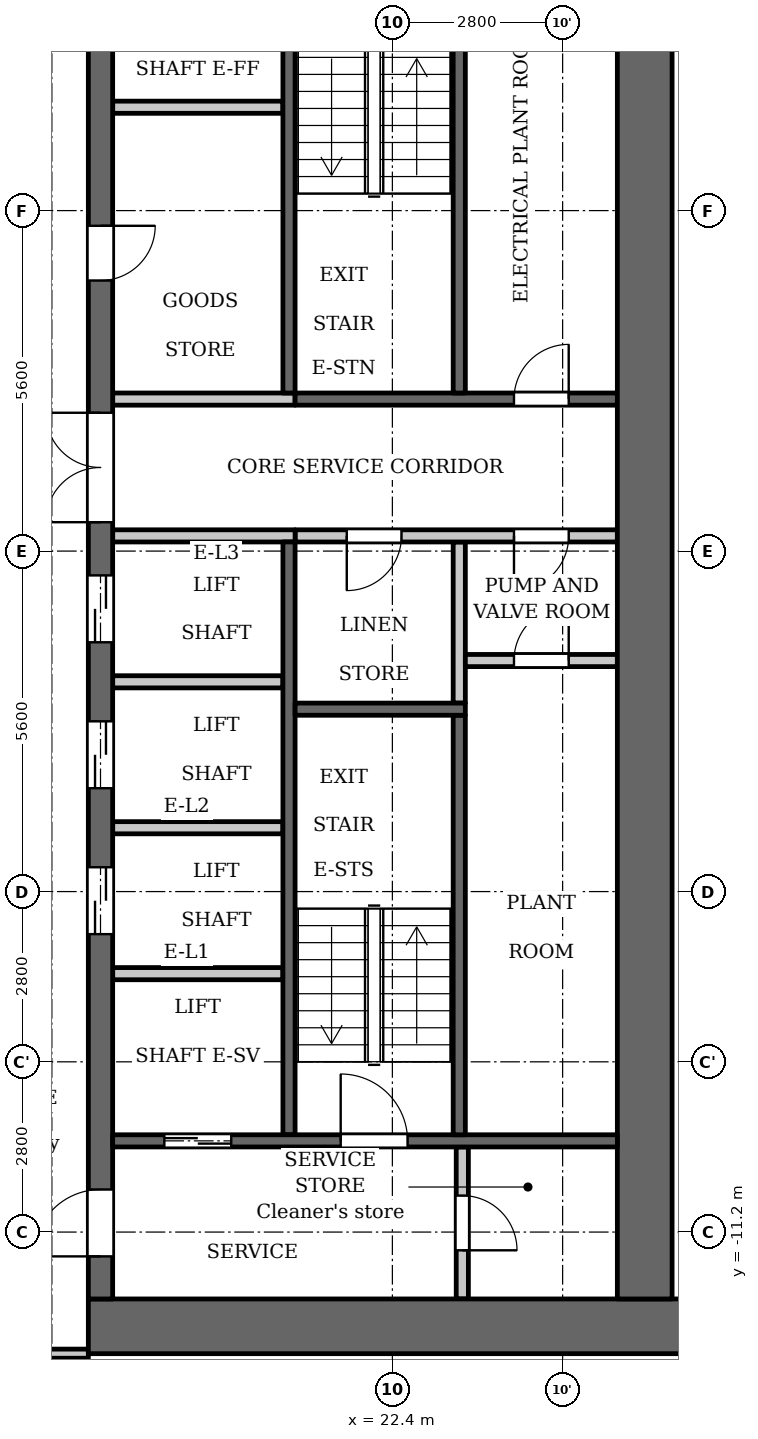
"""IFC4 building model, lengths in metres.
Left out: names, types, materials, properties, quantities, classifications, styles, units other than length and angle.
Written with IfcOpenShell. Run it as: python <this file> out.ifc"""

import sys

from ifc_helpers import new_model, si_unit, direction, frame, frame_2d, origin, place, context, subcontext, project, spatial, rectangle, extrude, element, fill, save


model = new_model("IFC4")
c1 = context("Model", 3, precision=1e-05, world=origin(), true_north=direction((0.0, 1.0)))
c2 = subcontext(c1, "Body", "Model", "MODEL_VIEW")
j1 = project(units=[si_unit("LENGTHUNIT", "METRE"), si_unit("PLANEANGLEUNIT", "RADIAN")], contexts=[c1])
p1 = place(None, origin())
s1 = spatial("IfcSite", under=j1, at=p1, CompositionType="ELEMENT")
p2 = place(p1, origin())
s2 = spatial("IfcBuilding", under=s1, at=p2, CompositionType="ELEMENT")
p3 = place(p2, frame((0.0, 0.0, 34.0)))
s3 = spatial("IfcBuildingStorey", under=s2, at=p3, CompositionType="ELEMENT", Elevation=34.0)
p4 = place(p3, frame((23.5, -2.5, 0.0), z_axis=(0.0, 0.0, 1.0), x_axis=(0.0, 1.0, 0.0)))
e1 = element("IfcWall", 1, at=p4, inside=s3, PredefinedType="PARTITIONING", context=c2, shape_type="SweptSolid", body=[
    extrude(rectangle(XDim=2.65, YDim=0.2, at=frame_2d((1.325, 0.0))), origin(), (0.0, 0.0, 1.0), 3.2),
])
p5 = place(p3, frame((20.7, 2.6, 0.0), z_axis=(0.0, 0.0, 1.0), x_axis=(0.0, 1.0, 0.0)))
e2 = element("IfcWall", 2, at=p5, inside=s3, PredefinedType="SHEAR", context=c2, shape_type="SweptSolid", body=[
    extrude(rectangle(XDim=7.0, YDim=0.2, at=frame_2d((3.5, 0.0))), origin(), (0.0, 0.0, 1.0), 3.2),
])
p6 = place(p3, frame((20.7, -9.6, 0.0), z_axis=(0.0, 0.0, 1.0), x_axis=(0.0, 1.0, 0.0)))
e3 = element("IfcWall", 3, at=p6, inside=s3, PredefinedType="SHEAR", context=c2, shape_type="SweptSolid", body=[
    extrude(rectangle(XDim=9.75, YDim=0.2, at=frame_2d((4.875, 0.0))), origin(), (0.0, 0.0, 1.0), 3.2),
])
p7 = place(p3, frame((20.8, 2.5, 0.0), z_axis=(0.0, 0.0, 1.0), x_axis=(1.0, 0.0, 0.0)))
e4 = element("IfcWall", 4, at=p7, inside=s3, PredefinedType="SHEAR", context=c2, shape_type="SweptSolid", body=[
    extrude(rectangle(XDim=5.3, YDim=0.2, at=frame_2d((2.65, 0.0))), origin(), (0.0, 0.0, 1.0), 3.2),
])
p8 = place(p7, frame((3.6, 0.0, 0.0)))
e5 = element("IfcOpeningElement", 5, at=p8, cuts=e4, PredefinedType="OPENING", context=c2, shape_type="SweptSolid", body=[
    extrude(rectangle(XDim=0.9, YDim=2.1, at=frame_2d((0.45, 1.05))), frame((0.0, 0.11, 0.0), z_axis=(0.0, -1.0, 0.0), x_axis=(1.0, 0.0, 0.0)), (0.0, 0.0, 1.0), 0.22),
])
p9 = place(p3, frame((20.8, 0.25, 0.0), z_axis=(0.0, 0.0, 1.0), x_axis=(1.0, 0.0, 0.0)))
e6 = element("IfcWall", 6, at=p9, inside=s3, PredefinedType="PARTITIONING", context=c2, shape_type="SweptSolid", body=[
    extrude(rectangle(XDim=5.3, YDim=0.2, at=frame_2d((2.65, 0.0))), origin(), (0.0, 0.0, 1.0), 3.2),
])
p10 = place(p9, frame((0.85, 0.0, 0.0)))
e7 = element("IfcOpeningElement", 7, at=p10, cuts=e6, PredefinedType="OPENING", context=c2, shape_type="SweptSolid", body=[
    extrude(rectangle(XDim=0.9, YDim=2.1, at=frame_2d((0.45, 1.05))), frame((0.0, 0.11, 0.0), z_axis=(0.0, -1.0, 0.0), x_axis=(1.0, 0.0, 0.0)), (0.0, 0.0, 1.0), 0.22),
])
p11 = place(p9, frame((3.6, 0.0, 0.0)))
e8 = element("IfcOpeningElement", 8, at=p11, cuts=e6, PredefinedType="OPENING", context=c2, shape_type="SweptSolid", body=[
    extrude(rectangle(XDim=0.9, YDim=2.1, at=frame_2d((0.45, 1.05))), frame((0.0, 0.11, 0.0), z_axis=(0.0, -1.0, 0.0), x_axis=(1.0, 0.0, 0.0)), (0.0, 0.0, 1.0), 0.22),
])
p12 = place(p3, frame((17.4, -12.75, 0.0), z_axis=(0.0, 0.0, 1.0), x_axis=(1.0, 0.0, 0.0)))
e9 = element("IfcWall", 9, at=p12, inside=s3, PredefinedType="SHEAR", context=c2, shape_type="SweptSolid", body=[
    extrude(rectangle(XDim=10.4, YDim=0.9, at=frame_2d((5.2, 0.0))), origin(), (0.0, 0.0, 1.0), 3.2),
])
p13 = place(p3, frame((17.6, -12.3, 0.0), z_axis=(0.0, 0.0, 1.0), x_axis=(0.0, 1.0, 0.0)))
e10 = element("IfcWall", 10, at=p13, inside=s3, PredefinedType="SHEAR", context=c2, shape_type="SweptSolid", body=[
    extrude(rectangle(XDim=24.6, YDim=0.4, at=frame_2d((12.3, 0.0))), origin(), (0.0, 0.0, 1.0), 3.2),
])
p14 = place(p13, frame((6.0, 0.0, 0.0)))
e11 = element("IfcOpeningElement", 11, at=p14, cuts=e10, PredefinedType="OPENING", context=c2, shape_type="SweptSolid", body=[
    extrude(rectangle(XDim=1.1, YDim=2.1, at=frame_2d((0.55, 1.05))), frame((0.0, 0.21, 0.0), z_axis=(0.0, -1.0, 0.0), x_axis=(1.0, 0.0, 0.0)), (0.0, 0.0, 1.0), 0.42),
])
p15 = place(p13, frame((8.4, 0.0, 0.0)))
e12 = element("IfcOpeningElement", 12, at=p15, cuts=e10, PredefinedType="OPENING", context=c2, shape_type="SweptSolid", body=[
    extrude(rectangle(XDim=1.1, YDim=2.1, at=frame_2d((0.55, 1.05))), frame((0.0, 0.21, 0.0), z_axis=(0.0, -1.0, 0.0), x_axis=(1.0, 0.0, 0.0)), (0.0, 0.0, 1.0), 0.42),
])
p16 = place(p13, frame((10.8, 0.0, 0.0)))
e13 = element("IfcOpeningElement", 13, at=p16, cuts=e10, PredefinedType="OPENING", context=c2, shape_type="SweptSolid", body=[
    extrude(rectangle(XDim=1.1, YDim=2.1, at=frame_2d((0.55, 1.05))), frame((0.0, 0.21, 0.0), z_axis=(0.0, -1.0, 0.0), x_axis=(1.0, 0.0, 0.0)), (0.0, 0.0, 1.0), 0.42),
])
p17 = place(p13, frame((16.75, 0.0, 0.0)))
e14 = element("IfcOpeningElement", 14, at=p17, cuts=e10, PredefinedType="OPENING", context=c2, shape_type="SweptSolid", body=[
    extrude(rectangle(XDim=0.9, YDim=2.1, at=frame_2d((0.45, 1.05))), frame((0.0, 0.21, 0.0), z_axis=(0.0, -1.0, 0.0), x_axis=(1.0, 0.0, 0.0)), (0.0, 0.0, 1.0), 0.42),
])
p18 = place(p13, frame((22.8, 0.0, 0.0)))
e15 = element("IfcOpeningElement", 15, at=p18, cuts=e10, PredefinedType="OPENING", context=c2, shape_type="SweptSolid", body=[
    extrude(rectangle(XDim=1.1, YDim=2.1, at=frame_2d((0.55, 1.05))), frame((0.0, 0.21, 0.0), z_axis=(0.0, -1.0, 0.0), x_axis=(1.0, 0.0, 0.0)), (0.0, 0.0, 1.0), 0.42),
])
p19 = place(p13, frame((0.7, 0.0, 0.0)))
e16 = element("IfcOpeningElement", 16, at=p19, cuts=e10, PredefinedType="OPENING", context=c2, shape_type="SweptSolid", body=[
    extrude(rectangle(XDim=1.1, YDim=2.1, at=frame_2d((0.55, 1.05))), frame((0.0, 0.21, 0.0), z_axis=(0.0, -1.0, 0.0), x_axis=(1.0, 0.0, 0.0)), (0.0, 0.0, 1.0), 0.42),
])
p20 = place(p13, frame((12.775, 0.0, 0.0)))
e17 = element("IfcOpeningElement", 17, at=p20, cuts=e10, PredefinedType="OPENING", context=c2, shape_type="SweptSolid", body=[
    extrude(rectangle(XDim=1.8, YDim=2.1, at=frame_2d((0.9, 1.05))), frame((0.0, 0.21, 0.0), z_axis=(0.0, -1.0, 0.0), x_axis=(1.0, 0.0, 0.0)), (0.0, 0.0, 1.0), 0.42),
])
p21 = place(p3, frame((26.55, -12.3, 0.0), z_axis=(0.0, 0.0, 1.0), x_axis=(0.0, 1.0, 0.0)))
e18 = element("IfcWall", 18, at=p21, inside=s3, PredefinedType="SHEAR", context=c2, shape_type="SweptSolid", body=[
    extrude(rectangle(XDim=24.6, YDim=0.9, at=frame_2d((12.3, 0.0))), origin(), (0.0, 0.0, 1.0), 3.2),
])
p22 = place(p3, frame((23.55, -12.3, 0.0), z_axis=(0.0, 0.0, 1.0), x_axis=(0.0, 1.0, 0.0)))
e19 = element("IfcWall", 19, at=p22, inside=s3, PredefinedType="PARTITIONING", context=c2, shape_type="SweptSolid", body=[
    extrude(rectangle(XDim=2.5, YDim=0.2, at=frame_2d((1.25, 0.0))), origin(), (0.0, 0.0, 1.0), 3.2),
])
p23 = place(p22, frame((0.8, 0.0, 0.0)))
e20 = element("IfcOpeningElement", 20, at=p23, cuts=e19, PredefinedType="OPENING", context=c2, shape_type="SweptSolid", body=[
    extrude(rectangle(XDim=0.9, YDim=2.1, at=frame_2d((0.45, 1.05))), frame((0.0, 0.11, 0.0), z_axis=(0.0, -1.0, 0.0), x_axis=(1.0, 0.0, 0.0)), (0.0, 0.0, 1.0), 0.22),
])
p24 = place(p3, frame((23.6, -1.8, 0.0), z_axis=(0.0, 0.0, 1.0), x_axis=(1.0, 0.0, 0.0)))
e21 = element("IfcWall", 21, at=p24, inside=s3, PredefinedType="PARTITIONING", context=c2, shape_type="SweptSolid", body=[
    extrude(rectangle(XDim=2.5, YDim=0.2, at=frame_2d((1.25, 0.0))), origin(), (0.0, 0.0, 1.0), 3.2),
])
p25 = place(p24, frame((0.8, 0.0, 0.0)))
e22 = element("IfcOpeningElement", 22, at=p25, cuts=e21, PredefinedType="OPENING", context=c2, shape_type="SweptSolid", body=[
    extrude(rectangle(XDim=0.9, YDim=2.1, at=frame_2d((0.45, 1.05))), frame((0.0, 0.11, 0.0), z_axis=(0.0, -1.0, 0.0), x_axis=(1.0, 0.0, 0.0)), (0.0, 0.0, 1.0), 0.22),
])
p26 = place(p3, frame((17.8, -9.7, 0.0), z_axis=(0.0, 0.0, 1.0), x_axis=(1.0, 0.0, 0.0)))
e23 = element("IfcWall", 23, at=p26, inside=s3, PredefinedType="SHEAR", context=c2, shape_type="SweptSolid", body=[
    extrude(rectangle(XDim=8.3, YDim=0.2, at=frame_2d((4.15, 0.0))), origin(), (0.0, 0.0, 1.0), 3.2),
])
p27 = place(p26, frame((0.85, 0.0, 0.0)))
e24 = element("IfcOpeningElement", 24, at=p27, cuts=e23, PredefinedType="OPENING", context=c2, shape_type="SweptSolid", body=[
    extrude(rectangle(XDim=1.1, YDim=2.1, at=frame_2d((0.55, 1.05))), frame((0.0, 0.11, 0.0), z_axis=(0.0, -1.0, 0.0), x_axis=(1.0, 0.0, 0.0)), (0.0, 0.0, 1.0), 0.22),
])
p28 = place(p26, frame((3.75, 0.0, 0.0)))
e25 = element("IfcOpeningElement", 25, at=p28, cuts=e23, PredefinedType="OPENING", context=c2, shape_type="SweptSolid", body=[
    extrude(rectangle(XDim=1.1, YDim=2.1, at=frame_2d((0.55, 1.05))), frame((0.0, 0.11, 0.0), z_axis=(0.0, -1.0, 0.0), x_axis=(1.0, 0.0, 0.0)), (0.0, 0.0, 1.0), 0.22),
])
for number, where, z_axis, x_axis in (
    (26, (17.8, -6.95, 0.0), (0.0, 0.0, 1.0), (1.0, 0.0, 0.0)),
    (27, (17.8, -4.55, 0.0), (0.0, 0.0, 1.0), (1.0, 0.0, 0.0)),
    (28, (17.8, -2.15, 0.0), (0.0, 0.0, 1.0), (1.0, 0.0, 0.0)),
):
    element("IfcWall", number, at=place(p3, frame(where, z_axis=z_axis, x_axis=x_axis)), inside=s3, PredefinedType="PARTITIONING", context=c2, shape_type="SweptSolid", body=[
        extrude(rectangle(XDim=2.8, YDim=0.2, at=frame_2d((1.4, 0.0))), origin(), (0.0, 0.0, 1.0), 3.2),
    ])
for number, where, z_axis, x_axis in (
    (29, (17.8, 0.25, 0.0), (0.0, 0.0, 1.0), (1.0, 0.0, 0.0)),
    (30, (17.8, 2.5, 0.0), (0.0, 0.0, 1.0), (1.0, 0.0, 0.0)),
):
    element("IfcWall", number, at=place(p3, frame(where, z_axis=z_axis, x_axis=x_axis)), inside=s3, PredefinedType="PARTITIONING", context=c2, shape_type="SweptSolid", body=[
        extrude(rectangle(XDim=3.0, YDim=0.2, at=frame_2d((1.5, 0.0))), origin(), (0.0, 0.0, 1.0), 3.2),
    ])
p29 = place(p3, frame((17.8, 7.3, 0.0), z_axis=(0.0, 0.0, 1.0), x_axis=(1.0, 0.0, 0.0)))
e31 = element("IfcWall", 31, at=p29, inside=s3, PredefinedType="PARTITIONING", context=c2, shape_type="SweptSolid", body=[
    extrude(rectangle(XDim=2.8, YDim=0.2, at=frame_2d((1.4, 0.0))), origin(), (0.0, 0.0, 1.0), 3.2),
])
p30 = place(p3, frame((23.5, 2.6, 0.0), z_axis=(0.0, 0.0, 1.0), x_axis=(0.0, 1.0, 0.0)))
e32 = element("IfcWall", 32, at=p30, inside=s3, PredefinedType="SHEAR", context=c2, shape_type="SweptSolid", body=[
    extrude(rectangle(XDim=7.0, YDim=0.2, at=frame_2d((3.5, 0.0))), origin(), (0.0, 0.0, 1.0), 3.2),
])
p31 = place(p3, frame((23.5, -9.6, 0.0), z_axis=(0.0, 0.0, 1.0), x_axis=(0.0, 1.0, 0.0)))
e33 = element("IfcWall", 33, at=p31, inside=s3, PredefinedType="SHEAR", context=c2, shape_type="SweptSolid", body=[
    extrude(rectangle(XDim=6.9, YDim=0.2, at=frame_2d((3.45, 0.0))), origin(), (0.0, 0.0, 1.0), 3.2),
])
p32 = place(p3, frame((20.8, -2.6, 0.0), z_axis=(0.0, 0.0, 1.0), x_axis=(1.0, 0.0, 0.0)))
e34 = element("IfcWall", 34, at=p32, inside=s3, PredefinedType="SHEAR", context=c2, shape_type="SweptSolid", body=[
    extrude(rectangle(XDim=2.8, YDim=0.2, at=frame_2d((1.4, 0.0))), origin(), (0.0, 0.0, 1.0), 3.2),
])
p33 = place(p3, frame((-17.4, -13.2, 0.0), z_axis=(0.0, 0.0, 1.0), x_axis=(1.0, 0.0, 0.0)))
e35 = element("IfcWall", 35, at=p33, inside=s3, PredefinedType="PARTITIONING", context=c2, shape_type="SweptSolid", body=[
    extrude(rectangle(XDim=34.8, YDim=0.15, at=frame_2d((17.4, 0.0))), origin(), (0.0, 0.0, 1.0), 3.2),
])
p34 = place(p33, frame((0.65, 0.0, 0.0)))
e36 = element("IfcOpeningElement", 36, at=p34, cuts=e35, PredefinedType="OPENING", context=c2, shape_type="SweptSolid", body=[
    extrude(rectangle(XDim=1.0, YDim=2.1, at=frame_2d((0.5, 1.05))), frame((0.0, 0.085, 0.0), z_axis=(0.0, -1.0, 0.0), x_axis=(1.0, 0.0, 0.0)), (0.0, 0.0, 1.0), 0.17),
])
p35 = place(p33, frame((33.05, 0.0, 0.0)))
e37 = element("IfcOpeningElement", 37, at=p35, cuts=e35, PredefinedType="OPENING", context=c2, shape_type="SweptSolid", body=[
    extrude(rectangle(XDim=1.0, YDim=2.1, at=frame_2d((0.5, 1.05))), frame((0.0, 0.085, 0.0), z_axis=(0.0, -1.0, 0.0), x_axis=(1.0, 0.0, 0.0)), (0.0, 0.0, 1.0), 0.17),
])
p36 = place(p33, frame((4.55, 0.0, 0.0)))
e38 = element("IfcOpeningElement", 38, at=p36, cuts=e35, PredefinedType="OPENING", context=c2, shape_type="SweptSolid", body=[
    extrude(rectangle(XDim=1.0, YDim=2.1, at=frame_2d((0.5, 1.05))), frame((0.0, 0.085, 0.0), z_axis=(0.0, -1.0, 0.0), x_axis=(1.0, 0.0, 0.0)), (0.0, 0.0, 1.0), 0.17),
])
p37 = place(p33, frame((6.9, 0.0, 0.0)))
e39 = element("IfcOpeningElement", 39, at=p37, cuts=e35, PredefinedType="OPENING", context=c2, shape_type="SweptSolid", body=[
    extrude(rectangle(XDim=1.0, YDim=2.1, at=frame_2d((0.5, 1.05))), frame((0.0, 0.085, 0.0), z_axis=(0.0, -1.0, 0.0), x_axis=(1.0, 0.0, 0.0)), (0.0, 0.0, 1.0), 0.17),
])
p38 = place(p33, frame((15.75, 0.0, 0.0)))
e40 = element("IfcOpeningElement", 40, at=p38, cuts=e35, PredefinedType="OPENING", context=c2, shape_type="SweptSolid", body=[
    extrude(rectangle(XDim=1.0, YDim=2.1, at=frame_2d((0.5, 1.05))), frame((0.0, 0.085, 0.0), z_axis=(0.0, -1.0, 0.0), x_axis=(1.0, 0.0, 0.0)), (0.0, 0.0, 1.0), 0.17),
])
p39 = place(p33, frame((18.1, 0.0, 0.0)))
e41 = element("IfcOpeningElement", 41, at=p39, cuts=e35, PredefinedType="OPENING", context=c2, shape_type="SweptSolid", body=[
    extrude(rectangle(XDim=1.0, YDim=2.1, at=frame_2d((0.5, 1.05))), frame((0.0, 0.085, 0.0), z_axis=(0.0, -1.0, 0.0), x_axis=(1.0, 0.0, 0.0)), (0.0, 0.0, 1.0), 0.17),
])
p40 = place(p33, frame((26.95, 0.0, 0.0)))
e42 = element("IfcOpeningElement", 42, at=p40, cuts=e35, PredefinedType="OPENING", context=c2, shape_type="SweptSolid", body=[
    extrude(rectangle(XDim=1.0, YDim=2.1, at=frame_2d((0.5, 1.05))), frame((0.0, 0.085, 0.0), z_axis=(0.0, -1.0, 0.0), x_axis=(1.0, 0.0, 0.0)), (0.0, 0.0, 1.0), 0.17),
])
p41 = place(p33, frame((29.25, 0.0, 0.0)))
e43 = element("IfcOpeningElement", 43, at=p41, cuts=e35, PredefinedType="OPENING", context=c2, shape_type="SweptSolid", body=[
    extrude(rectangle(XDim=1.0, YDim=2.1, at=frame_2d((0.5, 1.05))), frame((0.0, 0.085, 0.0), z_axis=(0.0, -1.0, 0.0), x_axis=(1.0, 0.0, 0.0)), (0.0, 0.0, 1.0), 0.17),
])
p42 = place(p27, origin())
e44 = element("IfcDoor", 44, at=p42, inside=s3, OperationType="DOUBLE_DOOR_SLIDING", PredefinedType="DOOR", context=c2, shape_type="SweptSolid", body=[
    extrude(rectangle(XDim=1.1, YDim=2.1, at=frame_2d((0.55, 1.05))), frame((0.0, 0.025, 0.0), z_axis=(0.0, -1.0, 0.0), x_axis=(1.0, 0.0, 0.0)), (0.0, 0.0, 1.0), 0.05),
])
fill(e24, e44)
p43 = place(p14, origin())
e45 = element("IfcDoor", 45, at=p43, inside=s3, OperationType="DOUBLE_DOOR_SLIDING", PredefinedType="DOOR", context=c2, shape_type="SweptSolid", body=[
    extrude(rectangle(XDim=1.1, YDim=2.1, at=frame_2d((0.55, 1.05))), frame((0.0, 0.025, 0.0), z_axis=(0.0, -1.0, 0.0), x_axis=(1.0, 0.0, 0.0)), (0.0, 0.0, 1.0), 0.05),
])
fill(e11, e45)
p44 = place(p15, origin())
e46 = element("IfcDoor", 46, at=p44, inside=s3, OperationType="DOUBLE_DOOR_SLIDING", PredefinedType="DOOR", context=c2, shape_type="SweptSolid", body=[
    extrude(rectangle(XDim=1.1, YDim=2.1, at=frame_2d((0.55, 1.05))), frame((0.0, 0.025, 0.0), z_axis=(0.0, -1.0, 0.0), x_axis=(1.0, 0.0, 0.0)), (0.0, 0.0, 1.0), 0.05),
])
fill(e12, e46)
p45 = place(p16, origin())
e47 = element("IfcDoor", 47, at=p45, inside=s3, OperationType="DOUBLE_DOOR_SLIDING", PredefinedType="DOOR", context=c2, shape_type="SweptSolid", body=[
    extrude(rectangle(XDim=1.1, YDim=2.1, at=frame_2d((0.55, 1.05))), frame((0.0, 0.025, 0.0), z_axis=(0.0, -1.0, 0.0), x_axis=(1.0, 0.0, 0.0)), (0.0, 0.0, 1.0), 0.05),
])
fill(e13, e47)
p46 = place(p17, origin())
e48 = element("IfcDoor", 48, at=p46, inside=s3, OperationType="SINGLE_SWING_RIGHT", PredefinedType="DOOR", context=c2, shape_type="SweptSolid", body=[
    extrude(rectangle(XDim=0.9, YDim=2.1, at=frame_2d((0.45, 1.05))), frame((0.0, 0.025, 0.0), z_axis=(0.0, -1.0, 0.0), x_axis=(1.0, 0.0, 0.0)), (0.0, 0.0, 1.0), 0.05),
])
fill(e14, e48)
p47 = place(p19, origin())
e49 = element("IfcDoor", 49, at=p47, inside=s3, OperationType="SINGLE_SWING_RIGHT", PredefinedType="DOOR", context=c2, shape_type="SweptSolid", body=[
    extrude(rectangle(XDim=1.1, YDim=2.1, at=frame_2d((0.55, 1.05))), frame((0.0, 0.025, 0.0), z_axis=(0.0, -1.0, 0.0), x_axis=(1.0, 0.0, 0.0)), (0.0, 0.0, 1.0), 0.05),
])
fill(e16, e49)
p48 = place(p23, origin())
e50 = element("IfcDoor", 50, at=p48, inside=s3, OperationType="SINGLE_SWING_LEFT", PredefinedType="DOOR", context=c2, shape_type="SweptSolid", body=[
    extrude(rectangle(XDim=0.9, YDim=2.1, at=frame_2d((0.45, 1.05))), frame((0.0, 0.025, 0.0), z_axis=(0.0, -1.0, 0.0), x_axis=(1.0, 0.0, 0.0)), (0.0, 0.0, 1.0), 0.05),
])
fill(e20, e50)
p49 = place(p28, origin())
e51 = element("IfcDoor", 51, at=p49, inside=s3, OperationType="SINGLE_SWING_RIGHT", PredefinedType="DOOR", context=c2, shape_type="SweptSolid", body=[
    extrude(rectangle(XDim=1.1, YDim=2.1, at=frame_2d((0.55, 1.05))), frame((0.0, 0.025, 0.0), z_axis=(0.0, -1.0, 0.0), x_axis=(1.0, 0.0, 0.0)), (0.0, 0.0, 1.0), 0.05),
])
fill(e25, e51)
p50 = place(p20, origin())
e52 = element("IfcDoor", 52, at=p50, inside=s3, OperationType="DOUBLE_DOOR_SINGLE_SWING", PredefinedType="DOOR", context=c2, shape_type="SweptSolid", body=[
    extrude(rectangle(XDim=1.8, YDim=2.1, at=frame_2d((0.9, 1.05))), frame((0.0, 0.025, 0.0), z_axis=(0.0, -1.0, 0.0), x_axis=(1.0, 0.0, 0.0)), (0.0, 0.0, 1.0), 0.05),
])
fill(e17, e52)
p51 = place(p10, origin())
e53 = element("IfcDoor", 53, at=p51, inside=s3, OperationType="SINGLE_SWING_LEFT", PredefinedType="DOOR", context=c2, shape_type="SweptSolid", body=[
    extrude(rectangle(XDim=0.9, YDim=2.1, at=frame_2d((0.45, 1.05))), frame((0.0, 0.025, 0.0), z_axis=(0.0, -1.0, 0.0), x_axis=(1.0, 0.0, 0.0)), (0.0, 0.0, 1.0), 0.05),
])
fill(e7, e53)
p52 = place(p25, origin())
e54 = element("IfcDoor", 54, at=p52, inside=s3, OperationType="SINGLE_SWING_LEFT", PredefinedType="DOOR", context=c2, shape_type="SweptSolid", body=[
    extrude(rectangle(XDim=0.9, YDim=2.1, at=frame_2d((0.45, 1.05))), frame((0.0, 0.025, 0.0), z_axis=(0.0, -1.0, 0.0), x_axis=(1.0, 0.0, 0.0)), (0.0, 0.0, 1.0), 0.05),
])
fill(e22, e54)
p53 = place(p11, origin())
e55 = element("IfcDoor", 55, at=p53, inside=s3, OperationType="SINGLE_SWING_LEFT", PredefinedType="DOOR", context=c2, shape_type="SweptSolid", body=[
    extrude(rectangle(XDim=0.9, YDim=2.1, at=frame_2d((0.45, 1.05))), frame((0.0, 0.025, 0.0), z_axis=(0.0, -1.0, 0.0), x_axis=(1.0, 0.0, 0.0)), (0.0, 0.0, 1.0), 0.05),
])
fill(e8, e55)
p54 = place(p8, origin())
e56 = element("IfcDoor", 56, at=p54, inside=s3, OperationType="SINGLE_SWING_LEFT", PredefinedType="DOOR", context=c2, shape_type="SweptSolid", body=[
    extrude(rectangle(XDim=0.9, YDim=2.1, at=frame_2d((0.45, 1.05))), frame((0.0, 0.025, 0.0), z_axis=(0.0, -1.0, 0.0), x_axis=(1.0, 0.0, 0.0)), (0.0, 0.0, 1.0), 0.05),
])
fill(e5, e56)
save(model, sys.argv[1])
